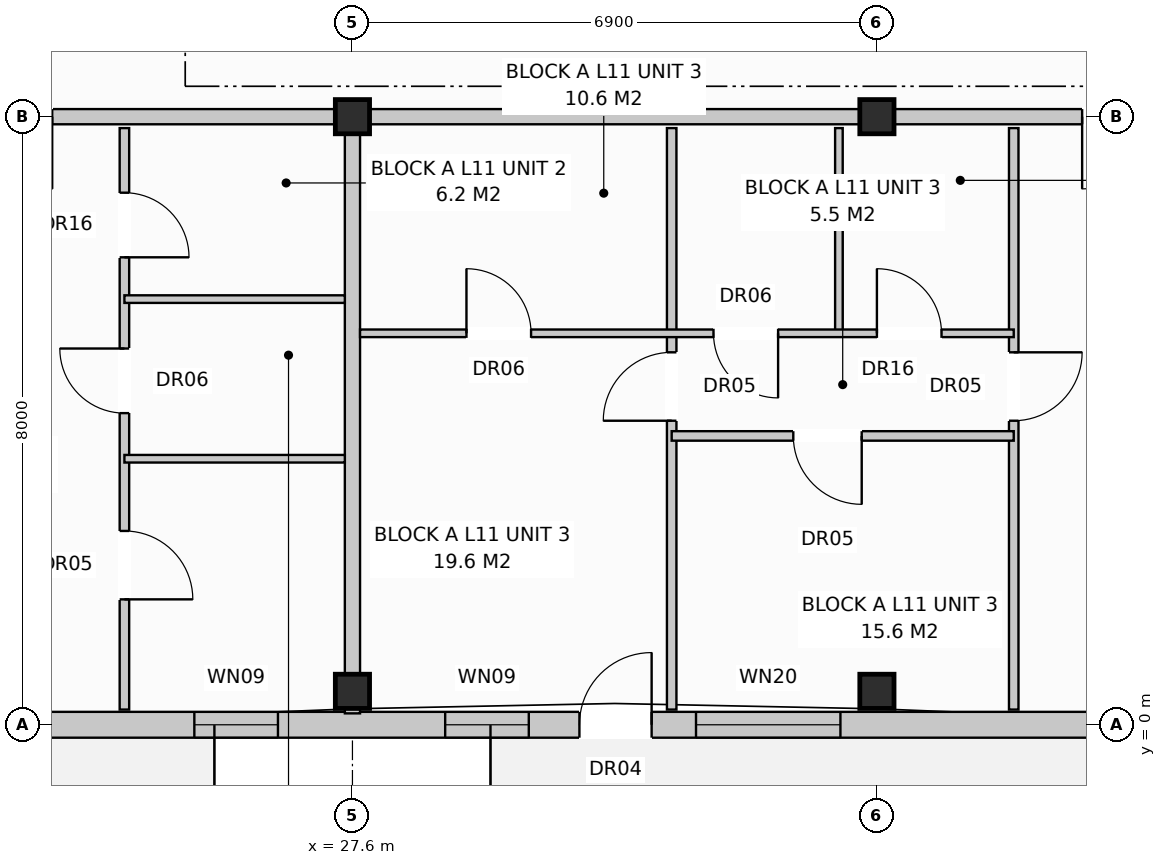
"""IFC4 building model, lengths in metres.
Left out: names, types, materials, properties, quantities, classifications, styles, units other than length and angle.
Written with IfcOpenShell. Run it as: python <this file> out.ifc"""

import sys

from ifc_helpers import new_model, si_unit, direction, frame, frame_2d, origin, origin_with_axes, origin_2d, place, context, subcontext, project, spatial, rectangle, extrude, element, fill, save


model = new_model("IFC4")
c1 = context("Model", 3, precision=1e-05, world=origin(), true_north=direction((0.0, 1.0)))
c2 = subcontext(c1, "Body", "Model", "MODEL_VIEW")
j1 = project(units=[si_unit("LENGTHUNIT", "METRE"), si_unit("PLANEANGLEUNIT", "RADIAN")], contexts=[c1])
p1 = place(None, origin())
s1 = spatial("IfcSite", under=j1, at=p1, CompositionType="ELEMENT")
p2 = place(p1, origin())
s2 = spatial("IfcBuilding", under=s1, at=p2, CompositionType="ELEMENT")
p3 = place(p2, frame((0.0, 0.0, 36.8)))
s3 = spatial("IfcBuildingStorey", under=s2, at=p3, CompositionType="ELEMENT", Elevation=36.8)
for number, where, z_axis, x_axis in (
    (1, (27.6, 0.44, 0.0), (0.0, 0.0, 1.0), (1.0, 0.0, 0.0)),
    (2, (27.6, 8.0, 0.0), (0.0, 0.0, 1.0), (1.0, 0.0, 0.0)),
    (3, (34.5, 0.44, 0.0), (0.0, 0.0, 1.0), (1.0, 0.0, 0.0)),
    (4, (34.5, 8.0, 0.0), (0.0, 0.0, 1.0), (1.0, 0.0, 0.0)),
):
    element("IfcColumn", number, at=place(p3, frame(where, z_axis=z_axis, x_axis=x_axis)), inside=s3, PredefinedType="COLUMN", context=c2, shape_type="SweptSolid", body=[
        extrude(rectangle(XDim=0.45, YDim=0.45, at=origin_2d()), origin(), (0.0, 0.0, 1.0), 3.2),
    ])
p4 = place(p3, frame((0.16, 0.0, 0.0), z_axis=(0.0, 0.0, 1.0), x_axis=(1.0, 0.0, 0.0)))
e5 = element("IfcWall", 5, at=p4, inside=s3, PredefinedType="STANDARD", context=c2, shape_type="SweptSolid", body=[
    extrude(rectangle(XDim=41.08, YDim=0.34, at=frame_2d((20.54, 0.0))), origin(), (0.0, 0.0, 1.0), 2.97),
])
p5 = place(p4, frame((4.926, 0.0, 0.0)))
e6 = element("IfcOpeningElement", 6, at=p5, cuts=e5, PredefinedType="OPENING", context=c2, shape_type="SweptSolid", body=[
    extrude(rectangle(XDim=0.95, YDim=2.1, at=frame_2d((0.475, 1.05))), frame((0.0, 0.182, 0.0), z_axis=(0.0, -1.0, 0.0), x_axis=(1.0, 0.0, 0.0)), (0.0, 0.0, 1.0), 0.364),
])
p6 = place(p4, frame((18.91, 0.0, 0.0)))
e7 = element("IfcOpeningElement", 7, at=p6, cuts=e5, PredefinedType="OPENING", context=c2, shape_type="SweptSolid", body=[
    extrude(rectangle(XDim=0.95, YDim=2.1, at=frame_2d((0.475, 1.05))), frame((0.0, 0.182, 0.0), z_axis=(0.0, -1.0, 0.0), x_axis=(1.0, 0.0, 0.0)), (0.0, 0.0, 1.0), 0.364),
])
p7 = place(p4, frame((30.426, 0.0, 0.0)))
e8 = element("IfcOpeningElement", 8, at=p7, cuts=e5, PredefinedType="OPENING", context=c2, shape_type="SweptSolid", body=[
    extrude(rectangle(XDim=0.95, YDim=2.1, at=frame_2d((0.475, 1.05))), frame((0.0, 0.182, 0.0), z_axis=(0.0, -1.0, 0.0), x_axis=(1.0, 0.0, 0.0)), (0.0, 0.0, 1.0), 0.364),
])
p8 = place(p4, frame((2.46, 0.0, 0.72)))
e9 = element("IfcOpeningElement", 9, at=p8, cuts=e5, PredefinedType="OPENING", context=c2, shape_type="SweptSolid", body=[
    extrude(rectangle(XDim=1.1, YDim=1.5, at=frame_2d((0.55, 0.75))), frame((0.0, 0.182, 0.0), z_axis=(0.0, -1.0, 0.0), x_axis=(1.0, 0.0, 0.0)), (0.0, 0.0, 1.0), 0.364),
])
p9 = place(p4, frame((7.76, 0.0, 0.72)))
e10 = element("IfcOpeningElement", 10, at=p9, cuts=e5, PredefinedType="OPENING", context=c2, shape_type="SweptSolid", body=[
    extrude(rectangle(XDim=1.9, YDim=1.85, at=frame_2d((0.95, 0.925))), frame((0.0, 0.182, 0.0), z_axis=(0.0, -1.0, 0.0), x_axis=(1.0, 0.0, 0.0)), (0.0, 0.0, 1.0), 0.364),
])
p10 = place(p4, frame((14.56, 0.0, 0.72)))
e11 = element("IfcOpeningElement", 11, at=p10, cuts=e5, PredefinedType="OPENING", context=c2, shape_type="SweptSolid", body=[
    extrude(rectangle(XDim=1.1, YDim=1.5, at=frame_2d((0.55, 0.75))), frame((0.0, 0.182, 0.0), z_axis=(0.0, -1.0, 0.0), x_axis=(1.0, 0.0, 0.0)), (0.0, 0.0, 1.0), 0.364),
])
p11 = place(p4, frame((16.81, 0.0, 0.8)))
e12 = element("IfcOpeningElement", 12, at=p11, cuts=e5, PredefinedType="OPENING", context=c2, shape_type="SweptSolid", body=[
    extrude(rectangle(XDim=1.8, YDim=1.7, at=frame_2d((0.9, 0.85))), frame((0.0, 0.182, 0.0), z_axis=(0.0, -1.0, 0.0), x_axis=(1.0, 0.0, 0.0)), (0.0, 0.0, 1.0), 0.364),
])
p12 = place(p4, frame((21.56, 0.0, 0.72)))
e13 = element("IfcOpeningElement", 13, at=p12, cuts=e5, PredefinedType="OPENING", context=c2, shape_type="SweptSolid", body=[
    extrude(rectangle(XDim=1.9, YDim=1.85, at=frame_2d((0.95, 0.925))), frame((0.0, 0.182, 0.0), z_axis=(0.0, -1.0, 0.0), x_axis=(1.0, 0.0, 0.0)), (0.0, 0.0, 1.0), 0.364),
])
p13 = place(p4, frame((25.36, 0.0, 0.72)))
e14 = element("IfcOpeningElement", 14, at=p13, cuts=e5, PredefinedType="OPENING", context=c2, shape_type="SweptSolid", body=[
    extrude(rectangle(XDim=1.1, YDim=1.5, at=frame_2d((0.55, 0.75))), frame((0.0, 0.182, 0.0), z_axis=(0.0, -1.0, 0.0), x_axis=(1.0, 0.0, 0.0)), (0.0, 0.0, 1.0), 0.364),
])
p14 = place(p4, frame((28.66, 0.0, 0.72)))
e15 = element("IfcOpeningElement", 15, at=p14, cuts=e5, PredefinedType="OPENING", context=c2, shape_type="SweptSolid", body=[
    extrude(rectangle(XDim=1.1, YDim=1.5, at=frame_2d((0.55, 0.75))), frame((0.0, 0.182, 0.0), z_axis=(0.0, -1.0, 0.0), x_axis=(1.0, 0.0, 0.0)), (0.0, 0.0, 1.0), 0.364),
])
p15 = place(p4, frame((31.96, 0.0, 0.72)))
e16 = element("IfcOpeningElement", 16, at=p15, cuts=e5, PredefinedType="OPENING", context=c2, shape_type="SweptSolid", body=[
    extrude(rectangle(XDim=1.9, YDim=1.85, at=frame_2d((0.95, 0.925))), frame((0.0, 0.182, 0.0), z_axis=(0.0, -1.0, 0.0), x_axis=(1.0, 0.0, 0.0)), (0.0, 0.0, 1.0), 0.364),
])
p16 = place(p4, frame((38.06, 0.0, 0.72)))
e17 = element("IfcOpeningElement", 17, at=p16, cuts=e5, PredefinedType="OPENING", context=c2, shape_type="SweptSolid", body=[
    extrude(rectangle(XDim=1.1, YDim=1.5, at=frame_2d((0.55, 0.75))), frame((0.0, 0.182, 0.0), z_axis=(0.0, -1.0, 0.0), x_axis=(1.0, 0.0, 0.0)), (0.0, 0.0, 1.0), 0.364),
])
p17 = place(p3, frame((27.6, 7.85, 0.0), z_axis=(0.0, 0.0, 1.0), x_axis=(0.0, -1.0, 0.0)))
e18 = element("IfcWall", 18, at=p17, inside=s3, PredefinedType="PARTITIONING", context=c2, shape_type="SweptSolid", body=[
    extrude(rectangle(XDim=7.7, YDim=0.2, at=frame_2d((3.85, 0.0))), origin(), (0.0, 0.0, 1.0), 2.97),
])
p18 = place(p3, frame((20.7, 8.0, 0.0), z_axis=(0.0, 0.0, 1.0), x_axis=(1.0, 0.0, 0.0)))
e19 = element("IfcWall", 19, at=p18, inside=s3, PredefinedType="PARTITIONING", context=c2, shape_type="SweptSolid", body=[
    extrude(rectangle(XDim=6.9, YDim=0.2, at=frame_2d((3.45, 0.0))), origin(), (0.0, 0.0, 1.0), 2.41),
])
p19 = place(p18, frame((2.0, 0.0, 0.0)))
e20 = element("IfcOpeningElement", 20, at=p19, cuts=e19, PredefinedType="OPENING", context=c2, shape_type="SweptSolid", body=[
    extrude(rectangle(XDim=0.95, YDim=2.15, at=frame_2d((0.475, 1.075))), frame((0.0, 0.112, 0.0), z_axis=(0.0, -1.0, 0.0), x_axis=(1.0, 0.0, 0.0)), (0.0, 0.0, 1.0), 0.224),
])
p20 = place(p3, frame((24.6, 7.85, 0.0), z_axis=(0.0, 0.0, 1.0), x_axis=(0.0, -1.0, 0.0)))
e21 = element("IfcWall", 21, at=p20, inside=s3, PredefinedType="PARTITIONING", context=c2, shape_type="SweptSolid", body=[
    extrude(rectangle(XDim=7.65, YDim=0.125, at=frame_2d((3.825, 0.0))), origin(), (0.0, 0.0, 1.0), 2.97),
])
p21 = place(p20, frame((0.85, 0.0, 0.0)))
e22 = element("IfcOpeningElement", 22, at=p21, cuts=e21, PredefinedType="OPENING", context=c2, shape_type="SweptSolid", body=[
    extrude(rectangle(XDim=0.85, YDim=2.1, at=frame_2d((0.425, 1.05))), frame((0.0, 0.074, 0.0), z_axis=(0.0, -1.0, 0.0), x_axis=(1.0, 0.0, 0.0)), (0.0, 0.0, 1.0), 0.149),
])
p22 = place(p20, frame((2.9, 0.0, 0.0)))
e23 = element("IfcOpeningElement", 23, at=p22, cuts=e21, PredefinedType="OPENING", context=c2, shape_type="SweptSolid", body=[
    extrude(rectangle(XDim=0.85, YDim=2.05, at=frame_2d((0.425, 1.025))), frame((0.0, 0.074, 0.0), z_axis=(0.0, -1.0, 0.0), x_axis=(1.0, 0.0, 0.0)), (0.0, 0.0, 1.0), 0.149),
])
p23 = place(p20, frame((5.3, 0.0, 0.0)))
e24 = element("IfcOpeningElement", 24, at=p23, cuts=e21, PredefinedType="OPENING", context=c2, shape_type="SweptSolid", body=[
    extrude(rectangle(XDim=0.9, YDim=2.1, at=frame_2d((0.45, 1.05))), frame((0.0, 0.074, 0.0), z_axis=(0.0, -1.0, 0.0), x_axis=(1.0, 0.0, 0.0)), (0.0, 0.0, 1.0), 0.149),
])
for number, where, z_axis, x_axis in (
    (25, (24.6, 5.6, 0.0), (0.0, 0.0, 1.0), (1.0, 0.0, 0.0)),
    (26, (24.6, 3.5, 0.0), (0.0, 0.0, 1.0), (1.0, 0.0, 0.0)),
):
    element("IfcWall", number, at=place(p3, frame(where, z_axis=z_axis, x_axis=x_axis)), inside=s3, PredefinedType="PARTITIONING", context=c2, shape_type="SweptSolid", body=[
        extrude(rectangle(XDim=2.9, YDim=0.1, at=frame_2d((1.45, 0.0))), origin(), (0.0, 0.0, 1.0), 2.97),
    ])
p24 = place(p3, frame((27.6, 8.0, 0.0), z_axis=(0.0, 0.0, 1.0), x_axis=(1.0, 0.0, 0.0)))
e27 = element("IfcWall", 27, at=p24, inside=s3, PredefinedType="PARTITIONING", context=c2, shape_type="SweptSolid", body=[
    extrude(rectangle(XDim=13.8, YDim=0.2, at=frame_2d((6.9, 0.0))), origin(), (0.0, 0.0, 1.0), 2.41),
])
p25 = place(p24, frame((9.6, 0.0, 0.0)))
e28 = element("IfcOpeningElement", 28, at=p25, cuts=e27, PredefinedType="OPENING", context=c2, shape_type="SweptSolid", body=[
    extrude(rectangle(XDim=0.95, YDim=2.15, at=frame_2d((0.475, 1.075))), frame((0.0, 0.112, 0.0), z_axis=(0.0, -1.0, 0.0), x_axis=(1.0, 0.0, 0.0)), (0.0, 0.0, 1.0), 0.224),
])
p26 = place(p3, frame((36.3, 7.85, 0.0), z_axis=(0.0, 0.0, 1.0), x_axis=(0.0, -1.0, 0.0)))
e29 = element("IfcWall", 29, at=p26, inside=s3, PredefinedType="PARTITIONING", context=c2, shape_type="SweptSolid", body=[
    extrude(rectangle(XDim=7.65, YDim=0.125, at=frame_2d((3.825, 0.0))), origin(), (0.0, 0.0, 1.0), 2.97),
])
p27 = place(p26, frame((2.95, 0.0, 0.0)))
e30 = element("IfcOpeningElement", 30, at=p27, cuts=e29, PredefinedType="OPENING", context=c2, shape_type="SweptSolid", body=[
    extrude(rectangle(XDim=0.9, YDim=2.1, at=frame_2d((0.45, 1.05))), frame((0.0, 0.074, 0.0), z_axis=(0.0, -1.0, 0.0), x_axis=(1.0, 0.0, 0.0)), (0.0, 0.0, 1.0), 0.149),
])
p28 = place(p3, frame((31.8, 7.85, 0.0), z_axis=(0.0, 0.0, 1.0), x_axis=(0.0, -1.0, 0.0)))
e31 = element("IfcWall", 31, at=p28, inside=s3, PredefinedType="PARTITIONING", context=c2, shape_type="SweptSolid", body=[
    extrude(rectangle(XDim=7.65, YDim=0.125, at=frame_2d((3.825, 0.0))), origin(), (0.0, 0.0, 1.0), 2.97),
])
p29 = place(p28, frame((2.95, 0.0, 0.0)))
e32 = element("IfcOpeningElement", 32, at=p29, cuts=e31, PredefinedType="OPENING", context=c2, shape_type="SweptSolid", body=[
    extrude(rectangle(XDim=0.9, YDim=2.1, at=frame_2d((0.45, 1.05))), frame((0.0, 0.074, 0.0), z_axis=(0.0, -1.0, 0.0), x_axis=(1.0, 0.0, 0.0)), (0.0, 0.0, 1.0), 0.149),
])
p30 = place(p3, frame((34.0, 7.85, 0.0), z_axis=(0.0, 0.0, 1.0), x_axis=(0.0, -1.0, 0.0)))
e33 = element("IfcWall", 33, at=p30, inside=s3, PredefinedType="PARTITIONING", context=c2, shape_type="SweptSolid", body=[
    extrude(rectangle(XDim=2.7, YDim=0.1, at=frame_2d((1.35, 0.0))), origin(), (0.0, 0.0, 1.0), 2.97),
])
p31 = place(p3, frame((27.7, 5.15, 0.0), z_axis=(0.0, 0.0, 1.0), x_axis=(1.0, 0.0, 0.0)))
e34 = element("IfcWall", 34, at=p31, inside=s3, PredefinedType="PARTITIONING", context=c2, shape_type="SweptSolid", body=[
    extrude(rectangle(XDim=8.6, YDim=0.1, at=frame_2d((4.3, 0.0))), origin(), (0.0, 0.0, 1.0), 2.97),
])
p32 = place(p31, frame((1.4, 0.0, 0.0)))
e35 = element("IfcOpeningElement", 35, at=p32, cuts=e34, PredefinedType="OPENING", context=c2, shape_type="SweptSolid", body=[
    extrude(rectangle(XDim=0.85, YDim=2.05, at=frame_2d((0.425, 1.025))), frame((0.0, 0.062, 0.0), z_axis=(0.0, -1.0, 0.0), x_axis=(1.0, 0.0, 0.0)), (0.0, 0.0, 1.0), 0.124),
])
p33 = place(p31, frame((4.65, 0.0, 0.0)))
e36 = element("IfcOpeningElement", 36, at=p33, cuts=e34, PredefinedType="OPENING", context=c2, shape_type="SweptSolid", body=[
    extrude(rectangle(XDim=0.85, YDim=2.05, at=frame_2d((0.425, 1.025))), frame((0.0, 0.062, 0.0), z_axis=(0.0, -1.0, 0.0), x_axis=(1.0, 0.0, 0.0)), (0.0, 0.0, 1.0), 0.124),
])
p34 = place(p31, frame((6.8, 0.0, 0.0)))
e37 = element("IfcOpeningElement", 37, at=p34, cuts=e34, PredefinedType="OPENING", context=c2, shape_type="SweptSolid", body=[
    extrude(rectangle(XDim=0.85, YDim=2.1, at=frame_2d((0.425, 1.05))), frame((0.0, 0.062, 0.0), z_axis=(0.0, -1.0, 0.0), x_axis=(1.0, 0.0, 0.0)), (0.0, 0.0, 1.0), 0.124),
])
p35 = place(p3, frame((31.8, 3.8, 0.0), z_axis=(0.0, 0.0, 1.0), x_axis=(1.0, 0.0, 0.0)))
e38 = element("IfcWall", 38, at=p35, inside=s3, PredefinedType="PARTITIONING", context=c2, shape_type="SweptSolid", body=[
    extrude(rectangle(XDim=4.5, YDim=0.125, at=frame_2d((2.25, 0.0))), origin(), (0.0, 0.0, 1.0), 2.97),
])
p36 = place(p35, frame((1.6, 0.0, 0.0)))
e39 = element("IfcOpeningElement", 39, at=p36, cuts=e38, PredefinedType="OPENING", context=c2, shape_type="SweptSolid", body=[
    extrude(rectangle(XDim=0.9, YDim=2.1, at=frame_2d((0.45, 1.05))), frame((0.0, 0.074, 0.0), z_axis=(0.0, -1.0, 0.0), x_axis=(1.0, 0.0, 0.0)), (0.0, 0.0, 1.0), 0.149),
])
p37 = place(p7, origin_with_axes())
e40 = element("IfcDoor", 40, at=p37, inside=s3, OperationType="SINGLE_SWING_RIGHT", PredefinedType="DOOR", context=c2, shape_type="SweptSolid", body=[
    extrude(rectangle(XDim=0.95, YDim=2.1, at=frame_2d((0.475, 1.05))), frame((0.0, 0.025, 0.0), z_axis=(0.0, -1.0, 0.0), x_axis=(1.0, 0.0, 0.0)), (0.0, 0.0, 1.0), 0.05),
])
fill(e8, e40)
p38 = place(p13, origin_with_axes())
e41 = element("IfcWindow", 41, at=p38, inside=s3, PartitioningType="SINGLE_PANEL", PredefinedType="WINDOW", context=c2, shape_type="SweptSolid", body=[
    extrude(rectangle(XDim=1.1, YDim=1.5, at=frame_2d((0.55, 0.75))), frame((0.0, 0.03, 0.0), z_axis=(0.0, -1.0, 0.0), x_axis=(1.0, 0.0, 0.0)), (0.0, 0.0, 1.0), 0.06),
])
fill(e14, e41)
p39 = place(p14, origin_with_axes())
e42 = element("IfcWindow", 42, at=p39, inside=s3, PartitioningType="SINGLE_PANEL", PredefinedType="WINDOW", context=c2, shape_type="SweptSolid", body=[
    extrude(rectangle(XDim=1.1, YDim=1.5, at=frame_2d((0.55, 0.75))), frame((0.0, 0.03, 0.0), z_axis=(0.0, -1.0, 0.0), x_axis=(1.0, 0.0, 0.0)), (0.0, 0.0, 1.0), 0.06),
])
fill(e15, e42)
p40 = place(p15, origin_with_axes())
e43 = element("IfcWindow", 43, at=p40, inside=s3, PartitioningType="SINGLE_PANEL", PredefinedType="WINDOW", context=c2, shape_type="SweptSolid", body=[
    extrude(rectangle(XDim=1.9, YDim=1.85, at=frame_2d((0.95, 0.925))), frame((0.0, 0.03, 0.0), z_axis=(0.0, -1.0, 0.0), x_axis=(1.0, 0.0, 0.0)), (0.0, 0.0, 1.0), 0.06),
])
fill(e16, e43)
p41 = place(p21, origin_with_axes())
e44 = element("IfcDoor", 44, at=p41, inside=s3, OperationType="SINGLE_SWING_RIGHT", PredefinedType="DOOR", context=c2, shape_type="SweptSolid", body=[
    extrude(rectangle(XDim=0.85, YDim=2.1, at=frame_2d((0.425, 1.05))), frame((0.0, 0.025, 0.0), z_axis=(0.0, -1.0, 0.0), x_axis=(1.0, 0.0, 0.0)), (0.0, 0.0, 1.0), 0.05),
])
fill(e22, e44)
p42 = place(p22, frame((0.85, 0.0, 0.0), z_axis=(0.0, 0.0, 1.0), x_axis=(-1.0, 0.0, 0.0)))
e45 = element("IfcDoor", 45, at=p42, inside=s3, OperationType="SINGLE_SWING_LEFT", PredefinedType="DOOR", context=c2, shape_type="SweptSolid", body=[
    extrude(rectangle(XDim=0.85, YDim=2.05, at=frame_2d((0.425, 1.025))), frame((0.0, 0.025, 0.0), z_axis=(0.0, -1.0, 0.0), x_axis=(1.0, 0.0, 0.0)), (0.0, 0.0, 1.0), 0.05),
])
fill(e23, e45)
p43 = place(p23, origin_with_axes())
e46 = element("IfcDoor", 46, at=p43, inside=s3, OperationType="SINGLE_SWING_RIGHT", PredefinedType="DOOR", context=c2, shape_type="SweptSolid", body=[
    extrude(rectangle(XDim=0.9, YDim=2.1, at=frame_2d((0.45, 1.05))), frame((0.0, 0.025, 0.0), z_axis=(0.0, -1.0, 0.0), x_axis=(1.0, 0.0, 0.0)), (0.0, 0.0, 1.0), 0.05),
])
fill(e24, e46)
p44 = place(p25, frame((0.95, 0.0, 0.0), z_axis=(0.0, 0.0, 1.0), x_axis=(-1.0, 0.0, 0.0)))
e47 = element("IfcDoor", 47, at=p44, inside=s3, OperationType="SINGLE_SWING_LEFT", PredefinedType="DOOR", context=c2, shape_type="SweptSolid", body=[
    extrude(rectangle(XDim=0.95, YDim=2.15, at=frame_2d((0.475, 1.075))), frame((0.0, 0.025, 0.0), z_axis=(0.0, -1.0, 0.0), x_axis=(1.0, 0.0, 0.0)), (0.0, 0.0, 1.0), 0.05),
])
fill(e28, e47)
p45 = place(p27, origin_with_axes())
e48 = element("IfcDoor", 48, at=p45, inside=s3, OperationType="SINGLE_SWING_LEFT", PredefinedType="DOOR", context=c2, shape_type="SweptSolid", body=[
    extrude(rectangle(XDim=0.9, YDim=2.1, at=frame_2d((0.45, 1.05))), frame((0.0, 0.025, 0.0), z_axis=(0.0, -1.0, 0.0), x_axis=(1.0, 0.0, 0.0)), (0.0, 0.0, 1.0), 0.05),
])
fill(e30, e48)
p46 = place(p29, frame((0.9, 0.0, 0.0), z_axis=(0.0, 0.0, 1.0), x_axis=(-1.0, 0.0, 0.0)))
e49 = element("IfcDoor", 49, at=p46, inside=s3, OperationType="SINGLE_SWING_RIGHT", PredefinedType="DOOR", context=c2, shape_type="SweptSolid", body=[
    extrude(rectangle(XDim=0.9, YDim=2.1, at=frame_2d((0.45, 1.05))), frame((0.0, 0.025, 0.0), z_axis=(0.0, -1.0, 0.0), x_axis=(1.0, 0.0, 0.0)), (0.0, 0.0, 1.0), 0.05),
])
fill(e32, e49)
p47 = place(p32, origin_with_axes())
e50 = element("IfcDoor", 50, at=p47, inside=s3, OperationType="SINGLE_SWING_LEFT", PredefinedType="DOOR", context=c2, shape_type="SweptSolid", body=[
    extrude(rectangle(XDim=0.85, YDim=2.05, at=frame_2d((0.425, 1.025))), frame((0.0, 0.025, 0.0), z_axis=(0.0, -1.0, 0.0), x_axis=(1.0, 0.0, 0.0)), (0.0, 0.0, 1.0), 0.05),
])
fill(e35, e50)
p48 = place(p33, frame((0.85, 0.0, 0.0), z_axis=(0.0, 0.0, 1.0), x_axis=(-1.0, 0.0, 0.0)))
e51 = element("IfcDoor", 51, at=p48, inside=s3, OperationType="SINGLE_SWING_RIGHT", PredefinedType="DOOR", context=c2, shape_type="SweptSolid", body=[
    extrude(rectangle(XDim=0.85, YDim=2.05, at=frame_2d((0.425, 1.025))), frame((0.0, 0.025, 0.0), z_axis=(0.0, -1.0, 0.0), x_axis=(1.0, 0.0, 0.0)), (0.0, 0.0, 1.0), 0.05),
])
fill(e36, e51)
p49 = place(p34, origin_with_axes())
e52 = element("IfcDoor", 52, at=p49, inside=s3, OperationType="SINGLE_SWING_LEFT", PredefinedType="DOOR", context=c2, shape_type="SweptSolid", body=[
    extrude(rectangle(XDim=0.85, YDim=2.1, at=frame_2d((0.425, 1.05))), frame((0.0, 0.025, 0.0), z_axis=(0.0, -1.0, 0.0), x_axis=(1.0, 0.0, 0.0)), (0.0, 0.0, 1.0), 0.05),
])
fill(e37, e52)
p50 = place(p36, frame((0.9, 0.0, 0.0), z_axis=(0.0, 0.0, 1.0), x_axis=(-1.0, 0.0, 0.0)))
e53 = element("IfcDoor", 53, at=p50, inside=s3, OperationType="SINGLE_SWING_RIGHT", PredefinedType="DOOR", context=c2, shape_type="SweptSolid", body=[
    extrude(rectangle(XDim=0.9, YDim=2.1, at=frame_2d((0.45, 1.05))), frame((0.0, 0.025, 0.0), z_axis=(0.0, -1.0, 0.0), x_axis=(1.0, 0.0, 0.0)), (0.0, 0.0, 1.0), 0.05),
])
fill(e39, e53)
save(model, sys.argv[1])
